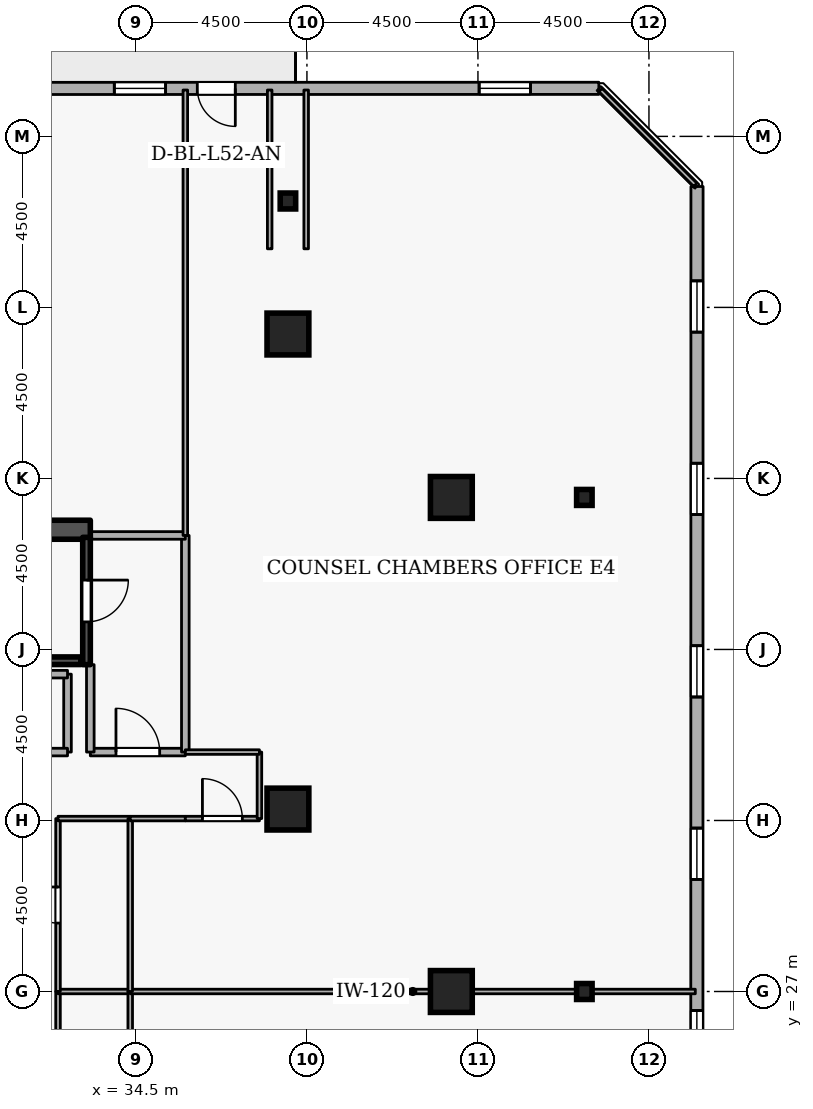
"""IFC4 building model, lengths in metres.
Left out: names, types, materials, properties, quantities, classifications, styles, units other than length and angle.
Written with IfcOpenShell. Run it as: python <this file> out.ifc"""

import sys

from ifc_helpers import new_model, si_unit, direction, frame, frame_2d, origin, origin_2d, place, context, subcontext, project, spatial, rectangle, i_section, extrude, element, fill, save


model = new_model("IFC4")
c1 = context("Model", 3, precision=1e-05, world=origin(), true_north=direction((0.0, 1.0)))
c2 = subcontext(c1, "Body", "Model", "MODEL_VIEW")
j1 = project(units=[si_unit("LENGTHUNIT", "METRE"), si_unit("PLANEANGLEUNIT", "RADIAN")], contexts=[c1])
p1 = place(None, origin())
s1 = spatial("IfcSite", under=j1, at=p1, CompositionType="ELEMENT")
p2 = place(p1, origin())
s2 = spatial("IfcBuilding", under=s1, at=p2, CompositionType="ELEMENT")
p3 = place(p2, frame((0.0, 0.0, 196.5)))
s3 = spatial("IfcBuildingStorey", under=s2, at=p3, CompositionType="ELEMENT", Elevation=196.5)
p4 = place(p3, frame((17.7, 39.15, 0.0), z_axis=(0.0, 0.0, 1.0), x_axis=(1.0, 0.0, 0.0)))
e1 = element("IfcWall", 1, at=p4, inside=s3, PredefinedType="SHEAR", context=c2, shape_type="SweptSolid", body=[
    extrude(rectangle(XDim=15.6, YDim=0.5, at=frame_2d((7.8, 0.0))), origin(), (0.0, 0.0, 1.0), 3.6),
])
for number, where, z_axis, x_axis in (
    (2, (42.8, 27.0, 0.0), (0.0, 0.0, 1.0), (1.0, 0.0, 0.0)),
    (3, (42.8, 40.0, 0.0), (0.0, 0.0, 1.0), (1.0, 0.0, 0.0)),
    (4, (38.5, 44.3, 0.0), (0.0, 0.0, 1.0), (1.0, 0.0, 0.0)),
    (5, (38.5, 31.8, 0.0), (0.0, 0.0, 1.0), (1.0, 0.0, 0.0)),
):
    element("IfcColumn", number, at=place(p3, frame(where, z_axis=z_axis, x_axis=x_axis)), inside=s3, PredefinedType="COLUMN", context=c2, shape_type="SweptSolid", body=[
        extrude(rectangle(XDim=1.1, YDim=1.1, at=origin_2d()), origin(), (0.0, 0.0, 1.0), 3.6),
    ])
for number, where, z_axis, x_axis in (
    (6, (46.3, 27.0, 0.0), (0.0, 0.0, 1.0), (1.0, 0.0, 0.0)),
    (7, (46.3, 40.0, 0.0), (0.0, 0.0, 1.0), (1.0, 0.0, 0.0)),
    (8, (38.5, 47.8, 0.0), (0.0, 0.0, 1.0), (1.0, 0.0, 0.0)),
):
    element("IfcColumn", number, at=place(p3, frame(where, z_axis=z_axis, x_axis=x_axis)), inside=s3, PredefinedType="COLUMN", context=c2, shape_type="SweptSolid", body=[
        extrude(i_section(OverallWidth=0.407, OverallDepth=0.419, WebThickness=0.031, FlangeThickness=0.049, FilletRadius=0.015, at=origin_2d()), origin(), (0.0, 0.0, 1.0), 3.6),
    ])
p5 = place(p3, frame((49.258, 13.749, 0.0), z_axis=(0.0, 0.0, 1.0), x_axis=(0.000184351399, 0.999999983007, 0.0)))
e9 = element("IfcWall", 9, at=p5, inside=s3, PredefinedType="STANDARD", context=c2, shape_type="SweptSolid", body=[
    extrude(rectangle(XDim=34.432, YDim=0.32, at=frame_2d((17.216, 0.0))), origin(), (0.0, 0.0, 1.0), 2.22),
])
p6 = place(p5, frame((1.8, 0.0, 0.72)))
e10 = element("IfcOpeningElement", 10, at=p6, cuts=e9, PredefinedType="OPENING", context=c2, shape_type="SweptSolid", body=[
    extrude(rectangle(XDim=1.35, YDim=1.05, at=frame_2d((0.675, 0.525))), frame((0.0, 0.17, 0.0), z_axis=(0.0, -1.0, 0.0), x_axis=(1.0, 0.0, 0.0)), (0.0, 0.0, 1.0), 0.34),
])
p7 = place(p5, frame((6.6, 0.0, 0.72)))
e11 = element("IfcOpeningElement", 11, at=p7, cuts=e9, PredefinedType="OPENING", context=c2, shape_type="SweptSolid", body=[
    extrude(rectangle(XDim=1.35, YDim=1.05, at=frame_2d((0.675, 0.525))), frame((0.0, 0.17, 0.0), z_axis=(0.0, -1.0, 0.0), x_axis=(1.0, 0.0, 0.0)), (0.0, 0.0, 1.0), 0.34),
])
p8 = place(p5, frame((11.4, 0.0, 0.72)))
e12 = element("IfcOpeningElement", 12, at=p8, cuts=e9, PredefinedType="OPENING", context=c2, shape_type="SweptSolid", body=[
    extrude(rectangle(XDim=1.35, YDim=1.05, at=frame_2d((0.675, 0.525))), frame((0.0, 0.17, 0.0), z_axis=(0.0, -1.0, 0.0), x_axis=(1.0, 0.0, 0.0)), (0.0, 0.0, 1.0), 0.34),
])
p9 = place(p5, frame((16.2, 0.0, 0.72)))
e13 = element("IfcOpeningElement", 13, at=p9, cuts=e9, PredefinedType="OPENING", context=c2, shape_type="SweptSolid", body=[
    extrude(rectangle(XDim=1.35, YDim=1.05, at=frame_2d((0.675, 0.525))), frame((0.0, 0.17, 0.0), z_axis=(0.0, -1.0, 0.0), x_axis=(1.0, 0.0, 0.0)), (0.0, 0.0, 1.0), 0.34),
])
p10 = place(p5, frame((21.0, 0.0, 0.72)))
e14 = element("IfcOpeningElement", 14, at=p10, cuts=e9, PredefinedType="OPENING", context=c2, shape_type="SweptSolid", body=[
    extrude(rectangle(XDim=1.35, YDim=1.05, at=frame_2d((0.675, 0.525))), frame((0.0, 0.17, 0.0), z_axis=(0.0, -1.0, 0.0), x_axis=(1.0, 0.0, 0.0)), (0.0, 0.0, 1.0), 0.34),
])
p11 = place(p5, frame((25.8, 0.0, 0.72)))
e15 = element("IfcOpeningElement", 15, at=p11, cuts=e9, PredefinedType="OPENING", context=c2, shape_type="SweptSolid", body=[
    extrude(rectangle(XDim=1.35, YDim=1.05, at=frame_2d((0.675, 0.525))), frame((0.0, 0.17, 0.0), z_axis=(0.0, -1.0, 0.0), x_axis=(1.0, 0.0, 0.0)), (0.0, 0.0, 1.0), 0.34),
])
p12 = place(p5, frame((30.6, 0.0, 0.72)))
e16 = element("IfcOpeningElement", 16, at=p12, cuts=e9, PredefinedType="OPENING", context=c2, shape_type="SweptSolid", body=[
    extrude(rectangle(XDim=1.35, YDim=1.05, at=frame_2d((0.675, 0.525))), frame((0.0, 0.17, 0.0), z_axis=(0.0, -1.0, 0.0), x_axis=(1.0, 0.0, 0.0)), (0.0, 0.0, 1.0), 0.34),
])
p13 = place(p3, frame((46.681, 50.765, 0.0), z_axis=(0.0, 0.0, 1.0), x_axis=(-0.999999983007, -0.000184351399, 0.0)))
e17 = element("IfcWall", 17, at=p13, inside=s3, PredefinedType="STANDARD", context=c2, shape_type="SweptSolid", body=[
    extrude(rectangle(XDim=34.432, YDim=0.32, at=frame_2d((17.216, 0.0))), origin(), (0.0, 0.0, 1.0), 2.22),
])
p14 = place(p13, frame((9.566, 0.0, 0.0)))
e18 = element("IfcOpeningElement", 18, at=p14, cuts=e17, PredefinedType="OPENING", context=c2, shape_type="SweptSolid", body=[
    extrude(rectangle(XDim=1.0, YDim=2.08, at=frame_2d((0.5, 1.04))), frame((0.0, 0.17, 0.0), z_axis=(0.0, -1.0, 0.0), x_axis=(1.0, 0.0, 0.0)), (0.0, 0.0, 1.0), 0.34),
])
p15 = place(p13, frame((1.8, 0.0, 0.72)))
e19 = element("IfcOpeningElement", 19, at=p15, cuts=e17, PredefinedType="OPENING", context=c2, shape_type="SweptSolid", body=[
    extrude(rectangle(XDim=1.35, YDim=1.05, at=frame_2d((0.675, 0.525))), frame((0.0, 0.17, 0.0), z_axis=(0.0, -1.0, 0.0), x_axis=(1.0, 0.0, 0.0)), (0.0, 0.0, 1.0), 0.34),
])
p16 = place(p13, frame((11.4, 0.0, 0.72)))
e20 = element("IfcOpeningElement", 20, at=p16, cuts=e17, PredefinedType="OPENING", context=c2, shape_type="SweptSolid", body=[
    extrude(rectangle(XDim=1.35, YDim=1.05, at=frame_2d((0.675, 0.525))), frame((0.0, 0.17, 0.0), z_axis=(0.0, -1.0, 0.0), x_axis=(1.0, 0.0, 0.0)), (0.0, 0.0, 1.0), 0.34),
])
p17 = place(p13, frame((16.2, 0.0, 0.72)))
e21 = element("IfcOpeningElement", 21, at=p17, cuts=e17, PredefinedType="OPENING", context=c2, shape_type="SweptSolid", body=[
    extrude(rectangle(XDim=1.35, YDim=1.05, at=frame_2d((0.675, 0.525))), frame((0.0, 0.17, 0.0), z_axis=(0.0, -1.0, 0.0), x_axis=(1.0, 0.0, 0.0)), (0.0, 0.0, 1.0), 0.34),
])
p18 = place(p13, frame((21.0, 0.0, 0.72)))
e22 = element("IfcOpeningElement", 22, at=p18, cuts=e17, PredefinedType="OPENING", context=c2, shape_type="SweptSolid", body=[
    extrude(rectangle(XDim=1.35, YDim=1.05, at=frame_2d((0.675, 0.525))), frame((0.0, 0.17, 0.0), z_axis=(0.0, -1.0, 0.0), x_axis=(1.0, 0.0, 0.0)), (0.0, 0.0, 1.0), 0.34),
])
p19 = place(p13, frame((25.8, 0.0, 0.72)))
e23 = element("IfcOpeningElement", 23, at=p19, cuts=e17, PredefinedType="OPENING", context=c2, shape_type="SweptSolid", body=[
    extrude(rectangle(XDim=1.35, YDim=1.05, at=frame_2d((0.675, 0.525))), frame((0.0, 0.17, 0.0), z_axis=(0.0, -1.0, 0.0), x_axis=(1.0, 0.0, 0.0)), (0.0, 0.0, 1.0), 0.34),
])
p20 = place(p13, frame((30.6, 0.0, 0.72)))
e24 = element("IfcOpeningElement", 24, at=p20, cuts=e17, PredefinedType="OPENING", context=c2, shape_type="SweptSolid", body=[
    extrude(rectangle(XDim=1.35, YDim=1.05, at=frame_2d((0.675, 0.525))), frame((0.0, 0.17, 0.0), z_axis=(0.0, -1.0, 0.0), x_axis=(1.0, 0.0, 0.0)), (0.0, 0.0, 1.0), 0.34),
])
p21 = place(p3, frame((33.2, 38.95, 0.0), z_axis=(0.0, 0.0, 1.0), x_axis=(0.0, -1.0, 0.0)))
e25 = element("IfcWall", 25, at=p21, inside=s3, PredefinedType="SHEAR", context=c2, shape_type="SweptSolid", body=[
    extrude(rectangle(XDim=3.35, YDim=0.2, at=frame_2d((1.675, 0.0))), origin(), (0.0, 0.0, 1.0), 3.6),
])
p22 = place(p21, frame((1.125, 0.0, 0.0)))
e26 = element("IfcOpeningElement", 26, at=p22, cuts=e25, PredefinedType="OPENING", context=c2, shape_type="SweptSolid", body=[
    extrude(rectangle(XDim=1.1, YDim=2.1, at=frame_2d((0.55, 1.05))), frame((0.0, 0.11, 0.0), z_axis=(0.0, -1.0, 0.0), x_axis=(1.0, 0.0, 0.0)), (0.0, 0.0, 1.0), 0.22),
])
p23 = place(p3, frame((25.95, 35.703, 0.0), z_axis=(0.0, 0.0, 1.0), x_axis=(1.0, 0.0, 0.0)))
e27 = element("IfcWall", 27, at=p23, inside=s3, PredefinedType="SHEAR", context=c2, shape_type="SweptSolid", body=[
    extrude(rectangle(XDim=7.1, YDim=0.2, at=frame_2d((3.55, 0.0))), origin(), (0.0, 0.0, 1.0), 3.6),
])
p24 = place(p3, frame((33.3, 33.3, 0.0), z_axis=(0.0, 0.0, 1.0), x_axis=(1.0, 0.0, 0.0)))
e28 = element("IfcWall", 28, at=p24, inside=s3, PredefinedType="STANDARD", context=c2, shape_type="SweptSolid", body=[
    extrude(rectangle(XDim=2.5, YDim=0.2, at=frame_2d((1.25, 0.0))), origin(), (0.0, 0.0, 1.0), 3.32),
])
p25 = place(p24, frame((0.675, 0.0, 0.0)))
e29 = element("IfcOpeningElement", 29, at=p25, cuts=e28, PredefinedType="OPENING", context=c2, shape_type="SweptSolid", body=[
    extrude(rectangle(XDim=1.15, YDim=2.1, at=frame_2d((0.575, 1.05))), frame((0.0, 0.11, 0.0), z_axis=(0.0, -1.0, 0.0), x_axis=(1.0, 0.0, 0.0)), (0.0, 0.0, 1.0), 0.22),
])
p26 = place(p3, frame((35.8, 33.3, 0.0), z_axis=(0.0, 0.0, 1.0), x_axis=(0.0, 1.0, 0.0)))
e30 = element("IfcWall", 30, at=p26, inside=s3, PredefinedType="STANDARD", context=c2, shape_type="SweptSolid", body=[
    extrude(rectangle(XDim=5.7, YDim=0.2, at=frame_2d((2.85, 0.0))), origin(), (0.0, 0.0, 1.0), 3.32),
])
p27 = place(p3, frame((35.8, 39.0, 0.0), z_axis=(0.0, 0.0, 1.0), x_axis=(-1.0, 0.0, 0.0)))
e31 = element("IfcWall", 31, at=p27, inside=s3, PredefinedType="STANDARD", context=c2, shape_type="SweptSolid", body=[
    extrude(rectangle(XDim=2.5, YDim=0.2, at=frame_2d((1.25, 0.0))), origin(), (0.0, 0.0, 1.0), 3.32),
])
p28 = place(p3, frame((33.3, 35.6, 0.0), z_axis=(0.0, 0.0, 1.0), x_axis=(0.0, -1.0, 0.0)))
e32 = element("IfcWall", 32, at=p28, inside=s3, PredefinedType="STANDARD", context=c2, shape_type="SweptSolid", body=[
    extrude(rectangle(XDim=2.3, YDim=0.2, at=frame_2d((1.15, 0.0))), origin(), (0.0, 0.0, 1.0), 2.525),
])
p29 = place(p3, frame((32.7, 35.35, 0.0), z_axis=(0.0, 0.0, 1.0), x_axis=(0.0, -1.0, 0.0)))
e33 = element("IfcWall", 33, at=p29, inside=s3, PredefinedType="STANDARD", context=c2, shape_type="SweptSolid", body=[
    extrude(rectangle(XDim=2.05, YDim=0.2, at=frame_2d((1.025, 0.0))), origin(), (0.0, 0.0, 1.0), 2.525),
])
p30 = place(p3, frame((32.7, 33.3, 0.0), z_axis=(0.0, 0.0, 1.0), x_axis=(-1.0, 0.0, 0.0)))
e34 = element("IfcWall", 34, at=p30, inside=s3, PredefinedType="STANDARD", context=c2, shape_type="SweptSolid", body=[
    extrude(rectangle(XDim=2.35, YDim=0.2, at=frame_2d((1.175, 0.0))), origin(), (0.0, 0.0, 1.0), 3.32),
])
p31 = place(p30, frame((0.6, 0.0, 0.0)))
e35 = element("IfcOpeningElement", 35, at=p31, cuts=e34, PredefinedType="OPENING", context=c2, shape_type="SweptSolid", body=[
    extrude(rectangle(XDim=1.15, YDim=2.1, at=frame_2d((0.575, 1.05))), frame((0.0, 0.11, 0.0), z_axis=(0.0, -1.0, 0.0), x_axis=(1.0, 0.0, 0.0)), (0.0, 0.0, 1.0), 0.22),
])
p32 = place(p3, frame((30.35, 35.35, 0.0), z_axis=(0.0, 0.0, 1.0), x_axis=(1.0, 0.0, 0.0)))
e36 = element("IfcWall", 36, at=p32, inside=s3, PredefinedType="STANDARD", context=c2, shape_type="SweptSolid", body=[
    extrude(rectangle(XDim=2.35, YDim=0.2, at=frame_2d((1.175, 0.0))), origin(), (0.0, 0.0, 1.0), 3.32),
])
p33 = place(p3, frame((32.45, 22.45, 0.0), z_axis=(0.0, 0.0, 1.0), x_axis=(0.0, 1.0, 0.0)))
e37 = element("IfcWall", 37, at=p33, inside=s3, PredefinedType="PARTITIONING", context=c2, shape_type="SweptSolid", body=[
    extrude(rectangle(XDim=4.55, YDim=0.12, at=frame_2d((2.275, 0.0))), origin(), (0.0, 0.0, 1.0), 3.32),
])
p34 = place(p33, frame((1.8, 0.0, 0.0)))
e38 = element("IfcOpeningElement", 38, at=p34, cuts=e37, PredefinedType="OPENING", context=c2, shape_type="SweptSolid", body=[
    extrude(rectangle(XDim=0.95, YDim=2.1, at=frame_2d((0.475, 1.05))), frame((0.0, 0.07, 0.0), z_axis=(0.0, -1.0, 0.0), x_axis=(1.0, 0.0, 0.0)), (0.0, 0.0, 1.0), 0.14),
])
p35 = place(p3, frame((32.45, 27.0, 0.0), z_axis=(0.0, 0.0, 1.0), x_axis=(1.0, 0.0, 0.0)))
e39 = element("IfcWall", 39, at=p35, inside=s3, PredefinedType="PARTITIONING", context=c2, shape_type="SweptSolid", body=[
    extrude(rectangle(XDim=1.9, YDim=0.12, at=frame_2d((0.95, 0.0))), origin(), (0.0, 0.0, 1.0), 3.32),
])
p36 = place(p3, frame((34.35, 27.0, 0.0), z_axis=(0.0, 0.0, 1.0), x_axis=(0.0, -1.0, 0.0)))
e40 = element("IfcWall", 40, at=p36, inside=s3, PredefinedType="PARTITIONING", context=c2, shape_type="SweptSolid", body=[
    extrude(rectangle(XDim=4.55, YDim=0.12, at=frame_2d((2.275, 0.0))), origin(), (0.0, 0.0, 1.0), 3.32),
])
p37 = place(p3, frame((34.35, 27.0, 0.0), z_axis=(0.0, 0.0, 1.0), x_axis=(1.0, 0.0, 0.0)))
e41 = element("IfcWall", 41, at=p37, inside=s3, PredefinedType="PARTITIONING", context=c2, shape_type="SweptSolid", body=[
    extrude(rectangle(XDim=14.87, YDim=0.12, at=frame_2d((7.435, 0.0))), origin(), (0.0, 0.0, 1.0), 2.862),
])
p38 = place(p3, frame((32.45, 27.0, 0.0), z_axis=(0.0, 0.0, 1.0), x_axis=(0.0, 1.0, 0.0)))
e42 = element("IfcWall", 42, at=p38, inside=s3, PredefinedType="PARTITIONING", context=c2, shape_type="SweptSolid", body=[
    extrude(rectangle(XDim=4.55, YDim=0.12, at=frame_2d((2.275, 0.0))), origin(), (0.0, 0.0, 1.0), 3.32),
])
p39 = place(p38, frame((1.8, 0.0, 0.0)))
e43 = element("IfcOpeningElement", 43, at=p39, cuts=e42, PredefinedType="OPENING", context=c2, shape_type="SweptSolid", body=[
    extrude(rectangle(XDim=0.95, YDim=2.1, at=frame_2d((0.475, 1.05))), frame((0.0, 0.07, 0.0), z_axis=(0.0, -1.0, 0.0), x_axis=(1.0, 0.0, 0.0)), (0.0, 0.0, 1.0), 0.14),
])
p40 = place(p3, frame((32.45, 31.55, 0.0), z_axis=(0.0, 0.0, 1.0), x_axis=(1.0, 0.0, 0.0)))
e44 = element("IfcWall", 44, at=p40, inside=s3, PredefinedType="PARTITIONING", context=c2, shape_type="SweptSolid", body=[
    extrude(rectangle(XDim=1.9, YDim=0.12, at=frame_2d((0.95, 0.0))), origin(), (0.0, 0.0, 1.0), 3.32),
])
p41 = place(p3, frame((34.35, 31.55, 0.0), z_axis=(0.0, 0.0, 1.0), x_axis=(0.0, -1.0, 0.0)))
e45 = element("IfcWall", 45, at=p41, inside=s3, PredefinedType="PARTITIONING", context=c2, shape_type="SweptSolid", body=[
    extrude(rectangle(XDim=4.55, YDim=0.12, at=frame_2d((2.275, 0.0))), origin(), (0.0, 0.0, 1.0), 3.32),
])
p42 = place(p3, frame((34.35, 31.55, 0.0), z_axis=(0.0, 0.0, 1.0), x_axis=(1.0, 0.0, 0.0)))
e46 = element("IfcWall", 46, at=p42, inside=s3, PredefinedType="PARTITIONING", context=c2, shape_type="SweptSolid", body=[
    extrude(rectangle(XDim=1.45, YDim=0.12, at=frame_2d((0.725, 0.0))), origin(), (0.0, 0.0, 1.0), 3.32),
])
p43 = place(p3, frame((35.8, 31.55, 0.0), z_axis=(0.0, 0.0, 1.0), x_axis=(1.0, 0.0, 0.0)))
e47 = element("IfcWall", 47, at=p43, inside=s3, PredefinedType="PARTITIONING", context=c2, shape_type="SweptSolid", body=[
    extrude(rectangle(XDim=1.95, YDim=0.12, at=frame_2d((0.975, 0.0))), origin(), (0.0, 0.0, 1.0), 3.32),
])
p44 = place(p43, frame((0.45, 0.0, 0.0)))
e48 = element("IfcOpeningElement", 48, at=p44, cuts=e47, PredefinedType="OPENING", context=c2, shape_type="SweptSolid", body=[
    extrude(rectangle(XDim=1.05, YDim=2.1, at=frame_2d((0.525, 1.05))), frame((0.0, 0.07, 0.0), z_axis=(0.0, -1.0, 0.0), x_axis=(1.0, 0.0, 0.0)), (0.0, 0.0, 1.0), 0.14),
])
p45 = place(p3, frame((37.75, 31.55, 0.0), z_axis=(0.0, 0.0, 1.0), x_axis=(0.0, 1.0, 0.0)))
e49 = element("IfcWall", 49, at=p45, inside=s3, PredefinedType="PARTITIONING", context=c2, shape_type="SweptSolid", body=[
    extrude(rectangle(XDim=1.75, YDim=0.12, at=frame_2d((0.875, 0.0))), origin(), (0.0, 0.0, 1.0), 3.32),
])
p46 = place(p3, frame((37.75, 33.3, 0.0), z_axis=(0.0, 0.0, 1.0), x_axis=(-1.0, 0.0, 0.0)))
e50 = element("IfcWall", 50, at=p46, inside=s3, PredefinedType="PARTITIONING", context=c2, shape_type="SweptSolid", body=[
    extrude(rectangle(XDim=1.95, YDim=0.12, at=frame_2d((0.975, 0.0))), origin(), (0.0, 0.0, 1.0), 3.32),
])
p47 = place(p3, frame((35.8, 39.0, 0.0), z_axis=(0.0, 0.0, 1.0), x_axis=(0.0, 1.0, 0.0)))
e51 = element("IfcWall", 51, at=p47, inside=s3, PredefinedType="PARTITIONING", context=c2, shape_type="SweptSolid", body=[
    extrude(rectangle(XDim=11.72, YDim=0.12, at=frame_2d((5.86, 0.0))), origin(), (0.0, 0.0, 1.0), 3.32),
])
for number, where, z_axis, x_axis in (
    (52, (38.02, 50.72, 0.0), (0.0, 0.0, 1.0), (0.0, -1.0, 0.0)),
    (53, (38.98, 46.542, 0.0), (0.0, 0.0, 1.0), (0.0, 1.0, 0.0)),
):
    element("IfcWall", number, at=place(p3, frame(where, z_axis=z_axis, x_axis=x_axis)), inside=s3, PredefinedType="PARTITIONING", context=c2, shape_type="SweptSolid", body=[
        extrude(rectangle(XDim=4.178, YDim=0.12, at=frame_2d((2.089, 0.0))), origin(), (0.0, 0.0, 1.0), 1.785),
    ])
p48 = place(p3, frame((46.725, 50.72, 0.0), z_axis=(0.0, 0.0, 1.0), x_axis=(0.707106781187, -0.707106781187, 0.0)))
e54 = element("IfcWall", 54, at=p48, inside=s3, PredefinedType="PARTITIONING", context=c2, shape_type="SweptSolid", body=[
    extrude(rectangle(XDim=3.528, YDim=0.12, at=frame_2d((1.764, 0.0))), origin(), (0.0, 0.0, 1.0), 3.32),
])
p49 = place(p8, origin())
e55 = element("IfcWindow", 55, at=p49, inside=s3, PartitioningType="SINGLE_PANEL", PredefinedType="WINDOW", context=c2, shape_type="SweptSolid", body=[
    extrude(rectangle(XDim=1.35, YDim=1.05, at=frame_2d((0.675, 0.525))), frame((0.0, 0.03, 0.0), z_axis=(0.0, -1.0, 0.0), x_axis=(1.0, 0.0, 0.0)), (0.0, 0.0, 1.0), 0.06),
])
fill(e12, e55)
p50 = place(p9, origin())
e56 = element("IfcWindow", 56, at=p50, inside=s3, PartitioningType="SINGLE_PANEL", PredefinedType="WINDOW", context=c2, shape_type="SweptSolid", body=[
    extrude(rectangle(XDim=1.35, YDim=1.05, at=frame_2d((0.675, 0.525))), frame((0.0, 0.03, 0.0), z_axis=(0.0, -1.0, 0.0), x_axis=(1.0, 0.0, 0.0)), (0.0, 0.0, 1.0), 0.06),
])
fill(e13, e56)
p51 = place(p10, origin())
e57 = element("IfcWindow", 57, at=p51, inside=s3, PartitioningType="SINGLE_PANEL", PredefinedType="WINDOW", context=c2, shape_type="SweptSolid", body=[
    extrude(rectangle(XDim=1.35, YDim=1.05, at=frame_2d((0.675, 0.525))), frame((0.0, 0.03, 0.0), z_axis=(0.0, -1.0, 0.0), x_axis=(1.0, 0.0, 0.0)), (0.0, 0.0, 1.0), 0.06),
])
fill(e14, e57)
p52 = place(p11, origin())
e58 = element("IfcWindow", 58, at=p52, inside=s3, PartitioningType="SINGLE_PANEL", PredefinedType="WINDOW", context=c2, shape_type="SweptSolid", body=[
    extrude(rectangle(XDim=1.35, YDim=1.05, at=frame_2d((0.675, 0.525))), frame((0.0, 0.03, 0.0), z_axis=(0.0, -1.0, 0.0), x_axis=(1.0, 0.0, 0.0)), (0.0, 0.0, 1.0), 0.06),
])
fill(e15, e58)
p53 = place(p12, origin())
e59 = element("IfcWindow", 59, at=p53, inside=s3, PartitioningType="SINGLE_PANEL", PredefinedType="WINDOW", context=c2, shape_type="SweptSolid", body=[
    extrude(rectangle(XDim=1.35, YDim=1.05, at=frame_2d((0.675, 0.525))), frame((0.0, 0.03, 0.0), z_axis=(0.0, -1.0, 0.0), x_axis=(1.0, 0.0, 0.0)), (0.0, 0.0, 1.0), 0.06),
])
fill(e16, e59)
p54 = place(p14, origin())
e60 = element("IfcDoor", 60, at=p54, inside=s3, OperationType="SINGLE_SWING_LEFT", PredefinedType="DOOR", context=c2, shape_type="SweptSolid", body=[
    extrude(rectangle(XDim=1.0, YDim=2.08, at=frame_2d((0.5, 1.04))), frame((0.0, 0.025, 0.0), z_axis=(0.0, -1.0, 0.0), x_axis=(1.0, 0.0, 0.0)), (0.0, 0.0, 1.0), 0.05),
])
fill(e18, e60)
p55 = place(p15, origin())
e61 = element("IfcWindow", 61, at=p55, inside=s3, PartitioningType="SINGLE_PANEL", PredefinedType="WINDOW", context=c2, shape_type="SweptSolid", body=[
    extrude(rectangle(XDim=1.35, YDim=1.05, at=frame_2d((0.675, 0.525))), frame((0.0, 0.03, 0.0), z_axis=(0.0, -1.0, 0.0), x_axis=(1.0, 0.0, 0.0)), (0.0, 0.0, 1.0), 0.06),
])
fill(e19, e61)
p56 = place(p16, origin())
e62 = element("IfcWindow", 62, at=p56, inside=s3, PartitioningType="SINGLE_PANEL", PredefinedType="WINDOW", context=c2, shape_type="SweptSolid", body=[
    extrude(rectangle(XDim=1.35, YDim=1.05, at=frame_2d((0.675, 0.525))), frame((0.0, 0.03, 0.0), z_axis=(0.0, -1.0, 0.0), x_axis=(1.0, 0.0, 0.0)), (0.0, 0.0, 1.0), 0.06),
])
fill(e20, e62)
p57 = place(p22, origin())
e63 = element("IfcDoor", 63, at=p57, inside=s3, OperationType="SINGLE_SWING_LEFT", PredefinedType="DOOR", context=c2, shape_type="SweptSolid", body=[
    extrude(rectangle(XDim=1.1, YDim=2.1, at=frame_2d((0.55, 1.05))), frame((0.0, 0.025, 0.0), z_axis=(0.0, -1.0, 0.0), x_axis=(1.0, 0.0, 0.0)), (0.0, 0.0, 1.0), 0.05),
])
fill(e26, e63)
p58 = place(p25, origin())
e64 = element("IfcDoor", 64, at=p58, inside=s3, OperationType="SINGLE_SWING_LEFT", PredefinedType="DOOR", context=c2, shape_type="SweptSolid", body=[
    extrude(rectangle(XDim=1.15, YDim=2.1, at=frame_2d((0.575, 1.05))), frame((0.0, 0.025, 0.0), z_axis=(0.0, -1.0, 0.0), x_axis=(1.0, 0.0, 0.0)), (0.0, 0.0, 1.0), 0.05),
])
fill(e29, e64)
p59 = place(p39, origin())
e65 = element("IfcDoor", 65, at=p59, inside=s3, OperationType="SINGLE_SWING_RIGHT", PredefinedType="DOOR", context=c2, shape_type="SweptSolid", body=[
    extrude(rectangle(XDim=0.95, YDim=2.1, at=frame_2d((0.475, 1.05))), frame((0.0, 0.025, 0.0), z_axis=(0.0, -1.0, 0.0), x_axis=(1.0, 0.0, 0.0)), (0.0, 0.0, 1.0), 0.05),
])
fill(e43, e65)
p60 = place(p44, origin())
e66 = element("IfcDoor", 66, at=p60, inside=s3, OperationType="SINGLE_SWING_LEFT", PredefinedType="DOOR", context=c2, shape_type="SweptSolid", body=[
    extrude(rectangle(XDim=1.05, YDim=2.1, at=frame_2d((0.525, 1.05))), frame((0.0, 0.025, 0.0), z_axis=(0.0, -1.0, 0.0), x_axis=(1.0, 0.0, 0.0)), (0.0, 0.0, 1.0), 0.05),
])
fill(e48, e66)
save(model, sys.argv[1])
